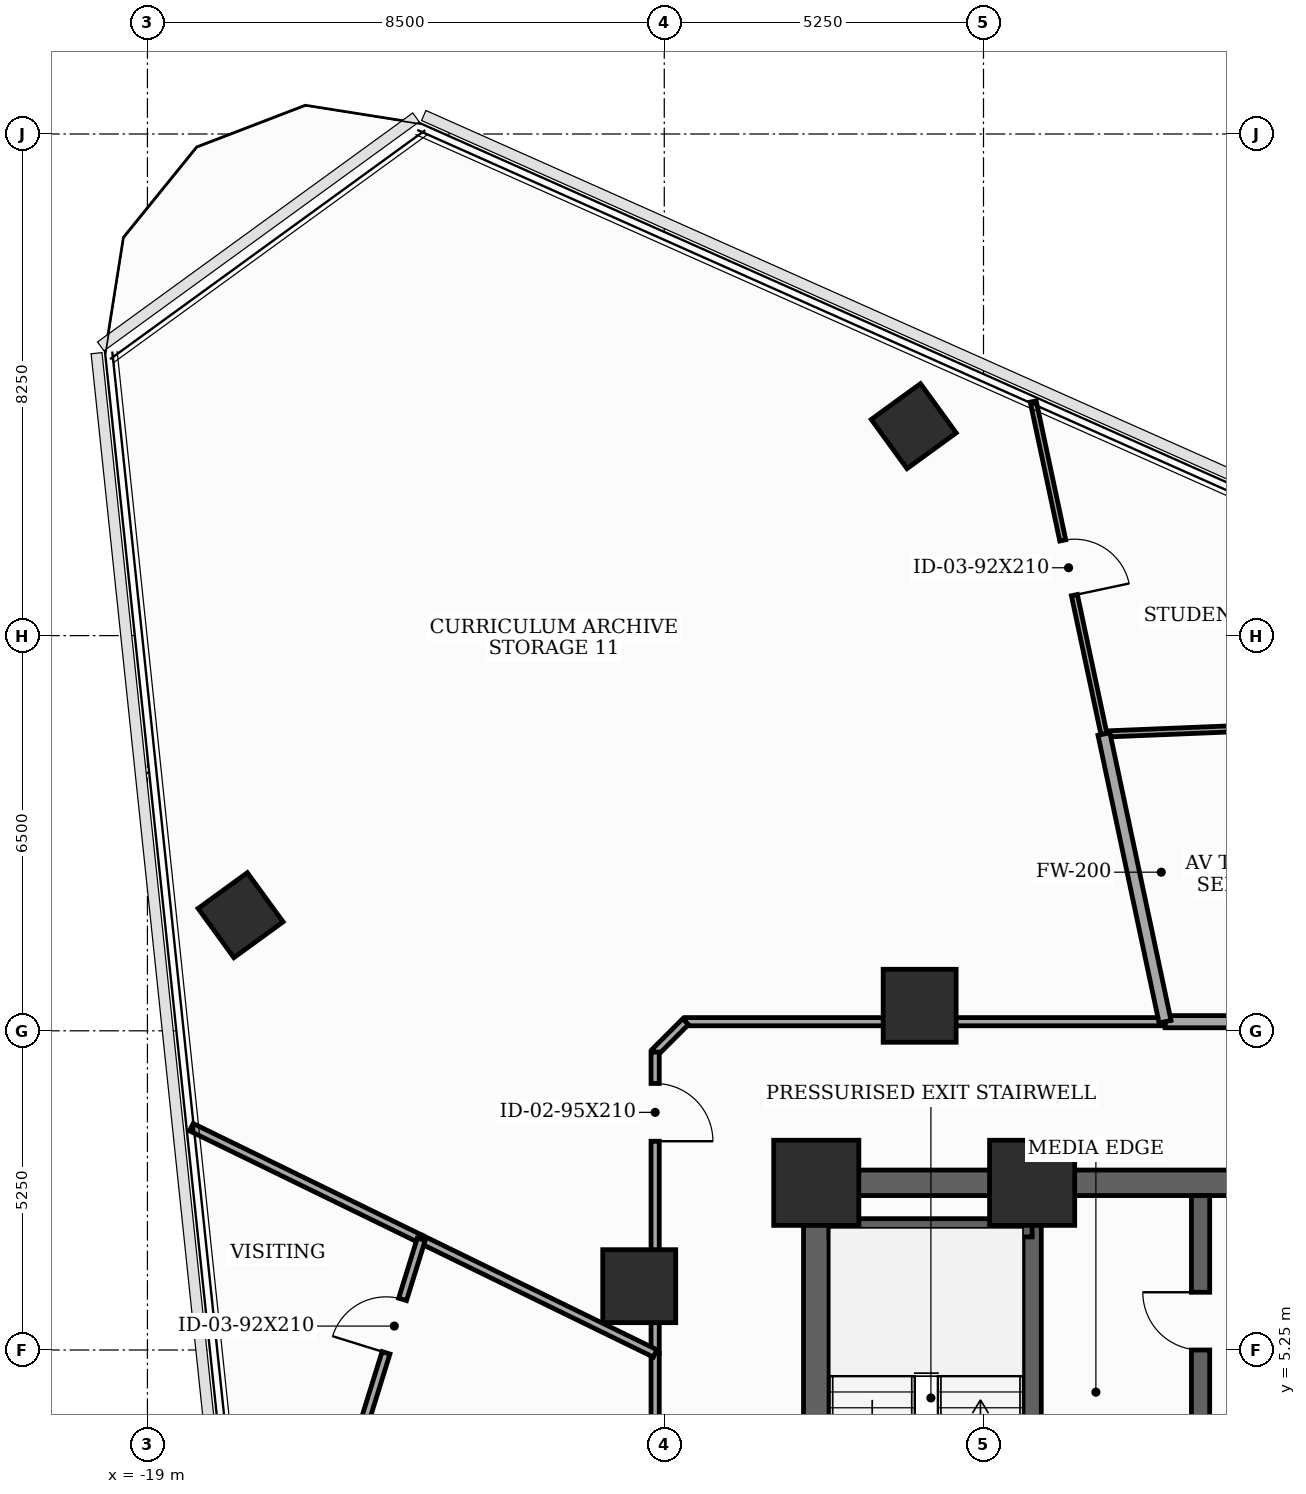
"""IFC4 building model, lengths in metres.
Left out: names, types, materials, properties, quantities, classifications, styles, units other than length and angle.
Written with IfcOpenShell. Run it as: python <this file> out.ifc"""

import sys

from ifc_helpers import new_model, si_unit, direction, frame, frame_2d, origin, origin_2d, place, context, subcontext, project, spatial, rectangle, extrude, element, fill, save


model = new_model("IFC4")
c1 = context("Model", 3, precision=1e-05, world=origin(), true_north=direction((0.0, 1.0)))
c2 = subcontext(c1, "Body", "Model", "MODEL_VIEW")
j1 = project(units=[si_unit("LENGTHUNIT", "METRE"), si_unit("PLANEANGLEUNIT", "RADIAN")], contexts=[c1])
p1 = place(None, origin())
s1 = spatial("IfcSite", under=j1, at=p1, CompositionType="ELEMENT")
p2 = place(p1, origin())
s2 = spatial("IfcBuilding", under=s1, at=p2, CompositionType="ELEMENT")
p3 = place(p2, frame((0.0, 0.0, 165.7)))
s3 = spatial("IfcBuildingStorey", under=s2, at=p3, CompositionType="ELEMENT", Elevation=165.7)
for number, where, z_axis, x_axis in (
    (1, (-4.45, 8.0, 0.0), (0.0, 0.0, 1.0), (1.0, 0.0, 0.0)),
    (2, (-8.0, 8.0, 0.0), (0.0, 0.0, 1.0), (1.0, 0.0, 0.0)),
):
    element("IfcColumn", number, at=place(p3, frame(where, z_axis=z_axis, x_axis=x_axis)), inside=s3, PredefinedType="COLUMN", context=c2, shape_type="SweptSolid", body=[
        extrude(rectangle(XDim=1.4, YDim=1.4, at=origin_2d()), origin(), (0.0, 0.0, 1.0), 3.7),
    ])
for number, where, z_axis, x_axis in (
    (3, (-6.3, 10.912, 0.0), (0.0, 0.0, 1.0), (1.0, 0.0, 0.0)),
    (4, (-10.912, 6.3, 0.0), (0.0, 0.0, 1.0), (1.0, 0.0, 0.0)),
):
    element("IfcColumn", number, at=place(p3, frame(where, z_axis=z_axis, x_axis=x_axis)), inside=s3, PredefinedType="COLUMN", context=c2, shape_type="SweptSolid", body=[
        extrude(rectangle(XDim=1.2, YDim=1.2, at=origin_2d()), origin(), (0.0, 0.0, 1.0), 3.7),
    ])
for number, where, z_axis, x_axis in (
    (5, (-6.397, 20.445, 0.0), (0.0, 0.0, 1.0), (0.809, 0.588, 0.0)),
    (6, (-17.468, 12.402, 0.0), (0.0, 0.0, 1.0), (0.809, 0.588, 0.0)),
):
    element("IfcColumn", number, at=place(p3, frame(where, z_axis=z_axis, x_axis=x_axis)), inside=s3, PredefinedType="COLUMN", context=c2, shape_type="SweptSolid", body=[
        extrude(rectangle(XDim=1.0, YDim=1.0, at=origin_2d()), origin(), (0.0, 0.0, 1.0), 3.7),
    ])
p4 = place(p3, frame((-8.0, -8.0, 0.0), z_axis=(0.0, 0.0, 1.0), x_axis=(0.0, 1.0, 0.0)))
e7 = element("IfcWall", 7, at=p4, inside=s3, PredefinedType="SHEAR", context=c2, shape_type="SweptSolid", body=[
    extrude(rectangle(XDim=16.0, YDim=0.42, at=frame_2d((8.0, 0.0))), origin(), (0.0, 0.0, 1.0), 3.5),
])
p5 = place(p4, frame((0.922, 0.0, 0.0)))
e8 = element("IfcOpeningElement", 8, at=p5, cuts=e7, PredefinedType="OPENING", context=c2, shape_type="SweptSolid", body=[
    extrude(rectangle(XDim=0.85, YDim=2.02, at=frame_2d((0.425, 1.01))), frame((0.0, 0.22, 0.0), z_axis=(0.0, -1.0, 0.0), x_axis=(1.0, 0.0, 0.0)), (0.0, 0.0, 1.0), 0.44),
])
p6 = place(p4, frame((5.35, 0.0, 0.0)))
e9 = element("IfcOpeningElement", 9, at=p6, cuts=e7, PredefinedType="OPENING", context=c2, shape_type="SweptSolid", body=[
    extrude(rectangle(XDim=1.05, YDim=2.15, at=frame_2d((0.525, 1.075))), frame((0.0, 0.22, 0.0), z_axis=(0.0, -1.0, 0.0), x_axis=(1.0, 0.0, 0.0)), (0.0, 0.0, 1.0), 0.44),
])
p7 = place(p3, frame((-8.0, 8.0, 0.0), z_axis=(0.0, 0.0, 1.0), x_axis=(1.0, 0.0, 0.0)))
e10 = element("IfcWall", 10, at=p7, inside=s3, PredefinedType="SHEAR", context=c2, shape_type="SweptSolid", body=[
    extrude(rectangle(XDim=16.0, YDim=0.42, at=frame_2d((8.0, 0.0))), origin(), (0.0, 0.0, 1.0), 3.5),
])
p8 = place(p7, frame((7.1, 0.0, 0.0)))
e11 = element("IfcOpeningElement", 11, at=p8, cuts=e10, PredefinedType="OPENING", context=c2, shape_type="SweptSolid", body=[
    extrude(rectangle(XDim=1.8, YDim=2.15, at=frame_2d((0.9, 1.075))), frame((0.0, 0.22, 0.0), z_axis=(0.0, -1.0, 0.0), x_axis=(1.0, 0.0, 0.0)), (0.0, 0.0, 1.0), 0.44),
])
p9 = place(p3, frame((-4.45, -7.79, 0.0), z_axis=(0.0, 0.0, 1.0), x_axis=(0.0, 1.0, 0.0)))
e12 = element("IfcWall", 12, at=p9, inside=s3, PredefinedType="SHEAR", context=c2, shape_type="SweptSolid", body=[
    extrude(rectangle(XDim=15.58, YDim=0.3, at=frame_2d((7.79, 0.0))), origin(), (0.0, 0.0, 1.0), 3.5),
])
p10 = place(p3, frame((-7.79, 7.26, 0.0), z_axis=(0.0, 0.0, 1.0), x_axis=(1.0, 0.0, 0.0)))
e13 = element("IfcWall", 13, at=p10, inside=s3, PredefinedType="SHEAR", context=c2, shape_type="SweptSolid", body=[
    extrude(rectangle(XDim=3.34, YDim=0.3, at=frame_2d((1.67, 0.0))), origin(), (0.0, 0.0, 1.0), 3.5),
])
p11 = place(p3, frame((-1.68, -4.85, 0.0), z_axis=(0.0, 0.0, 1.0), x_axis=(0.0, 1.0, 0.0)))
e14 = element("IfcWall", 14, at=p11, inside=s3, PredefinedType="SHEAR", context=c2, shape_type="SweptSolid", body=[
    extrude(rectangle(XDim=12.64, YDim=0.3, at=frame_2d((6.32, 0.0))), origin(), (0.0, 0.0, 1.0), 3.5),
])
p12 = place(p11, frame((1.65, 0.0, 0.0)))
e15 = element("IfcOpeningElement", 15, at=p12, cuts=e14, PredefinedType="OPENING", context=c2, shape_type="SweptSolid", body=[
    extrude(rectangle(XDim=0.95, YDim=2.1, at=frame_2d((0.475, 1.05))), frame((0.0, 0.16, 0.0), z_axis=(0.0, -1.0, 0.0), x_axis=(1.0, 0.0, 0.0)), (0.0, 0.0, 1.0), 0.32),
])
p13 = place(p11, frame((5.9, 0.0, 0.0)))
e16 = element("IfcOpeningElement", 16, at=p13, cuts=e14, PredefinedType="OPENING", context=c2, shape_type="SweptSolid", body=[
    extrude(rectangle(XDim=0.95, YDim=2.1, at=frame_2d((0.475, 1.05))), frame((0.0, 0.16, 0.0), z_axis=(0.0, -1.0, 0.0), x_axis=(1.0, 0.0, 0.0)), (0.0, 0.0, 1.0), 0.32),
])
p14 = place(p11, frame((10.1, 0.0, 0.0)))
e17 = element("IfcOpeningElement", 17, at=p14, cuts=e14, PredefinedType="OPENING", context=c2, shape_type="SweptSolid", body=[
    extrude(rectangle(XDim=0.95, YDim=2.1, at=frame_2d((0.475, 1.05))), frame((0.0, 0.16, 0.0), z_axis=(0.0, -1.0, 0.0), x_axis=(1.0, 0.0, 0.0)), (0.0, 0.0, 1.0), 0.32),
])
p15 = place(p3, frame((10.15, 10.65, 0.0), z_axis=(0.0, 0.0, 1.0), x_axis=(-1.0, 0.0, 0.0)))
e18 = element("IfcWall", 18, at=p15, inside=s3, PredefinedType="SOLIDWALL", context=c2, shape_type="SweptSolid", body=[
    extrude(rectangle(XDim=12.414, YDim=0.2, at=frame_2d((6.207, 0.0))), origin(), (0.0, 0.0, 1.0), 2.885),
])
p16 = place(p15, frame((7.222, 0.0, 0.0)))
e19 = element("IfcOpeningElement", 19, at=p16, cuts=e18, PredefinedType="OPENING", context=c2, shape_type="SweptSolid", body=[
    extrude(rectangle(XDim=0.95, YDim=2.1, at=frame_2d((0.475, 1.05))), frame((0.0, 0.11, 0.0), z_axis=(0.0, -1.0, 0.0), x_axis=(1.0, 0.0, 0.0)), (0.0, 0.0, 1.0), 0.22),
])
p17 = place(p3, frame((-2.264, 10.65, 0.0), z_axis=(0.0, 0.0, 1.0), x_axis=(-1.0, 0.0, 0.0)))
e20 = element("IfcWall", 20, at=p17, inside=s3, PredefinedType="PARTITIONING", context=c2, shape_type="SweptSolid", body=[
    extrude(rectangle(XDim=7.886, YDim=0.135, at=frame_2d((3.943, 0.0))), origin(), (0.0, 0.0, 1.0), 2.885),
])
p18 = place(p3, frame((-10.15, 10.65, 0.0), z_axis=(0.0, 0.0, 1.0), x_axis=(-0.707106781187, -0.707106781187, 0.0)))
e21 = element("IfcWall", 21, at=p18, inside=s3, PredefinedType="PARTITIONING", context=c2, shape_type="SweptSolid", body=[
    extrude(rectangle(XDim=0.707, YDim=0.135, at=frame_2d((0.354, 0.0))), origin(), (0.0, 0.0, 1.0), 3.5),
])
p19 = place(p3, frame((-10.65, 10.15, 0.0), z_axis=(0.0, 0.0, 1.0), x_axis=(0.0, -1.0, 0.0)))
e22 = element("IfcWall", 22, at=p19, inside=s3, PredefinedType="PARTITIONING", context=c2, shape_type="SweptSolid", body=[
    extrude(rectangle(XDim=4.956, YDim=0.135, at=frame_2d((2.478, 0.0))), origin(), (0.0, 0.0, 1.0), 2.885),
])
p20 = place(p19, frame((0.516, 0.0, 0.0)))
e23 = element("IfcOpeningElement", 23, at=p20, cuts=e22, PredefinedType="OPENING", context=c2, shape_type="SweptSolid", body=[
    extrude(rectangle(XDim=0.95, YDim=2.1, at=frame_2d((0.475, 1.05))), frame((0.0, 0.077, 0.0), z_axis=(0.0, -1.0, 0.0), x_axis=(1.0, 0.0, 0.0)), (0.0, 0.0, 1.0), 0.155),
])
p21 = place(p3, frame((-10.65, 5.194, 0.0), z_axis=(0.0, 0.0, 1.0), x_axis=(0.0, -1.0, 0.0)))
e24 = element("IfcWall", 24, at=p21, inside=s3, PredefinedType="PARTITIONING", context=c2, shape_type="SweptSolid", body=[
    extrude(rectangle(XDim=2.744, YDim=0.135, at=frame_2d((1.372, 0.0))), origin(), (0.0, 0.0, 1.0), 3.5),
])
p22 = place(p21, frame((1.226, 0.0, 0.0)))
e25 = element("IfcOpeningElement", 25, at=p22, cuts=e24, PredefinedType="OPENING", context=c2, shape_type="SweptSolid", body=[
    extrude(rectangle(XDim=0.95, YDim=2.1, at=frame_2d((0.475, 1.05))), frame((0.0, 0.077, 0.0), z_axis=(0.0, -1.0, 0.0), x_axis=(1.0, 0.0, 0.0)), (0.0, 0.0, 1.0), 0.155),
])
p23 = place(p3, frame((-3.269, 15.381, 0.0), z_axis=(0.0, 0.0, 1.0), x_axis=(0.999171753478, 0.040691609114, 0.0)))
e26 = element("IfcWall", 26, at=p23, inside=s3, PredefinedType="MOVABLE", context=c2, shape_type="SweptSolid", body=[
    extrude(rectangle(XDim=5.7, YDim=0.1, at=frame_2d((2.85, 0.0))), origin(), (0.0, 0.0, 1.0), 2.885),
])
p24 = place(p3, frame((-4.432, 20.851, 0.0), z_axis=(0.0, 0.0, 1.0), x_axis=(0.208032106743, -0.978121997792, 0.0)))
e27 = element("IfcWall", 27, at=p24, inside=s3, PredefinedType="MOVABLE", context=c2, shape_type="SweptSolid", body=[
    extrude(rectangle(XDim=5.592, YDim=0.1, at=frame_2d((2.796, 0.0))), origin(), (0.0, 0.0, 1.0), 2.985),
])
p25 = place(p24, frame((2.336, 0.0, 0.0)))
e28 = element("IfcOpeningElement", 28, at=p25, cuts=e27, PredefinedType="OPENING", context=c2, shape_type="SweptSolid", body=[
    extrude(rectangle(XDim=0.92, YDim=2.1, at=frame_2d((0.46, 1.05))), frame((0.0, 0.06, 0.0), z_axis=(0.0, -1.0, 0.0), x_axis=(1.0, 0.0, 0.0)), (0.0, 0.0, 1.0), 0.12),
])
p26 = place(p3, frame((-3.269, 15.381, 0.0), z_axis=(0.0, 0.0, 1.0), x_axis=(0.207808649559, -0.978169497157, 0.0)))
e29 = element("IfcWall", 29, at=p26, inside=s3, PredefinedType="SOLIDWALL", context=c2, shape_type="SweptSolid", body=[
    extrude(rectangle(XDim=4.837, YDim=0.2, at=frame_2d((2.418, 0.0))), origin(), (0.0, 0.0, 1.0), 2.885),
])
p27 = place(p3, frame((-18.277, 8.915, 0.0), z_axis=(0.0, 0.0, 1.0), x_axis=(0.898795221882, -0.43836873648, 0.0)))
e30 = element("IfcWall", 30, at=p27, inside=s3, PredefinedType="PARTITIONING", context=c2, shape_type="SweptSolid", body=[
    extrude(rectangle(XDim=4.206, YDim=0.135, at=frame_2d((2.103, 0.0))), origin(), (0.0, 0.0, 1.0), 2.985),
])
p28 = place(p3, frame((-14.497, 7.071, 0.0), z_axis=(0.0, 0.0, 1.0), x_axis=(0.89874213328, -0.438477568261, 0.0)))
e31 = element("IfcWall", 31, at=p28, inside=s3, PredefinedType="PARTITIONING", context=c2, shape_type="SweptSolid", body=[
    extrude(rectangle(XDim=4.281, YDim=0.135, at=frame_2d((2.14, 0.0))), origin(), (0.0, 0.0, 1.0), 2.885),
])
p29 = place(p3, frame((-16.079, 1.974, 0.0), z_axis=(0.0, 0.0, 1.0), x_axis=(0.296438064518, 0.955052079158, 0.0)))
e32 = element("IfcWall", 32, at=p29, inside=s3, PredefinedType="PARTITIONING", context=c2, shape_type="SweptSolid", body=[
    extrude(rectangle(XDim=5.337, YDim=0.135, at=frame_2d((2.668, 0.0))), origin(), (0.0, 0.0, 1.0), 2.885),
])
p30 = place(p29, frame((3.383, 0.0, 0.0)))
e33 = element("IfcOpeningElement", 33, at=p30, cuts=e32, PredefinedType="OPENING", context=c2, shape_type="SweptSolid", body=[
    extrude(rectangle(XDim=0.92, YDim=2.1, at=frame_2d((0.46, 1.05))), frame((0.0, 0.077, 0.0), z_axis=(0.0, -1.0, 0.0), x_axis=(1.0, 0.0, 0.0)), (0.0, 0.0, 1.0), 0.155),
])
p31 = place(p14, origin())
e34 = element("IfcDoor", 34, at=p31, inside=s3, OperationType="SINGLE_SWING_RIGHT", PredefinedType="DOOR", context=c2, shape_type="SweptSolid", body=[
    extrude(rectangle(XDim=0.95, YDim=2.1, at=frame_2d((0.475, 1.05))), frame((0.0, 0.025, 0.0), z_axis=(0.0, -1.0, 0.0), x_axis=(1.0, 0.0, 0.0)), (0.0, 0.0, 1.0), 0.05),
])
fill(e17, e34)
p32 = place(p20, origin())
e35 = element("IfcDoor", 35, at=p32, inside=s3, OperationType="SINGLE_SWING_RIGHT", PredefinedType="DOOR", context=c2, shape_type="SweptSolid", body=[
    extrude(rectangle(XDim=0.95, YDim=2.1, at=frame_2d((0.475, 1.05))), frame((0.0, 0.025, 0.0), z_axis=(0.0, -1.0, 0.0), x_axis=(1.0, 0.0, 0.0)), (0.0, 0.0, 1.0), 0.05),
])
fill(e23, e35)
p33 = place(p25, origin())
e36 = element("IfcDoor", 36, at=p33, inside=s3, OperationType="SINGLE_SWING_RIGHT", PredefinedType="DOOR", context=c2, shape_type="SweptSolid", body=[
    extrude(rectangle(XDim=0.92, YDim=2.1, at=frame_2d((0.46, 1.05))), frame((0.0, 0.025, 0.0), z_axis=(0.0, -1.0, 0.0), x_axis=(1.0, 0.0, 0.0)), (0.0, 0.0, 1.0), 0.05),
])
fill(e28, e36)
p34 = place(p30, origin())
e37 = element("IfcDoor", 37, at=p34, inside=s3, OperationType="SINGLE_SWING_LEFT", PredefinedType="DOOR", context=c2, shape_type="SweptSolid", body=[
    extrude(rectangle(XDim=0.92, YDim=2.1, at=frame_2d((0.46, 1.05))), frame((0.0, 0.025, 0.0), z_axis=(0.0, -1.0, 0.0), x_axis=(1.0, 0.0, 0.0)), (0.0, 0.0, 1.0), 0.05),
])
fill(e33, e37)
save(model, sys.argv[1])
